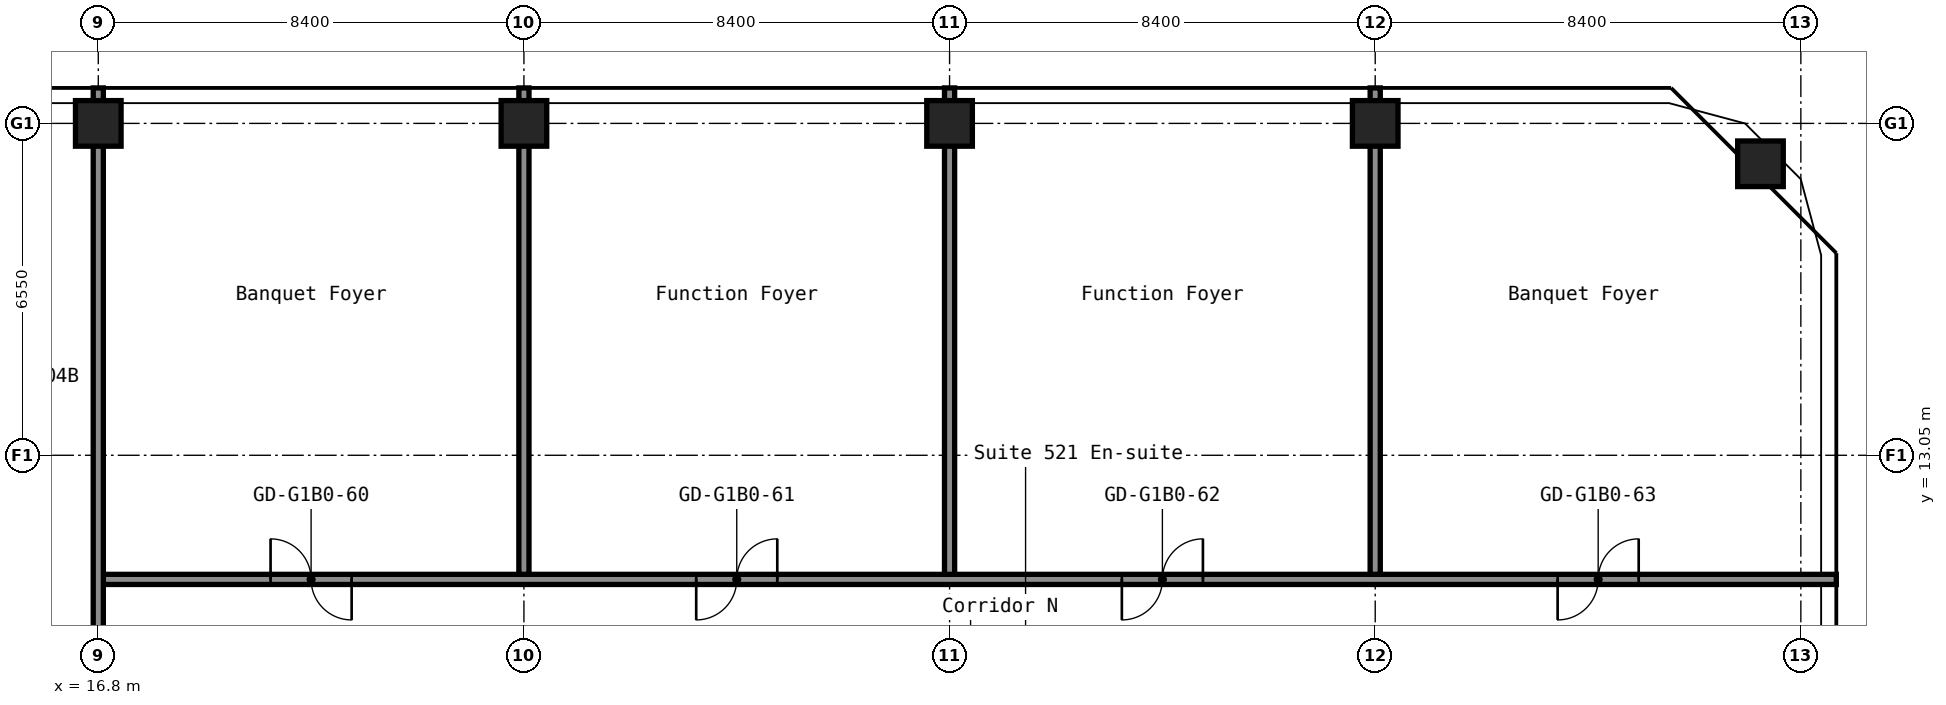
"""IFC4 building model, lengths in metres.
Left out: names, types, materials, properties, quantities, classifications, styles, units other than length and angle.
Written with IfcOpenShell. Run it as: python <this file> out.ifc"""

import sys

from ifc_helpers import new_model, si_unit, direction, frame, frame_2d, origin, origin_2d, place, context, subcontext, project, spatial, rectangle, hollow_rectangle, extrude, element, fill, save


model = new_model("IFC4")
c1 = context("Model", 3, precision=1e-05, world=origin(), true_north=direction((0.0, 1.0)))
c2 = subcontext(c1, "Body", "Model", "MODEL_VIEW")
j1 = project(units=[si_unit("LENGTHUNIT", "METRE"), si_unit("PLANEANGLEUNIT", "RADIAN")], contexts=[c1])
p1 = place(None, origin())
s1 = spatial("IfcSite", under=j1, at=p1, CompositionType="ELEMENT")
p2 = place(p1, origin())
s2 = spatial("IfcBuilding", under=s1, at=p2, CompositionType="ELEMENT")
p3 = place(p2, frame((0.0, 0.0, 23.0)))
s3 = spatial("IfcBuildingStorey", under=s2, at=p3, CompositionType="ELEMENT", Elevation=23.0)
for number, where, z_axis, x_axis in (
    (1, (16.8, 19.6, 0.0), (0.0, 0.0, 1.0), (1.0, 0.0, 0.0)),
    (2, (25.2, 19.6, 0.0), (0.0, 0.0, 1.0), (1.0, 0.0, 0.0)),
    (3, (33.6, 19.6, 0.0), (0.0, 0.0, 1.0), (1.0, 0.0, 0.0)),
    (4, (42.0, 19.6, 0.0), (0.0, 0.0, 1.0), (1.0, 0.0, 0.0)),
    (5, (49.603, 18.803, 0.0), (0.0, 0.0, 1.0), (1.0, 0.0, 0.0)),
):
    element("IfcColumn", number, at=place(p3, frame(where, z_axis=z_axis, x_axis=x_axis)), inside=s3, PredefinedType="COLUMN", context=c2, shape_type="SweptSolid", body=[
        extrude(hollow_rectangle(XDim=0.9, YDim=0.9, WallThickness=0.036, at=origin_2d()), origin(), (0.0, 0.0, 1.0), 2.8),
    ])
p4 = place(p3, frame((16.8, 10.6, 0.0), z_axis=(0.0, 0.0, 1.0), x_axis=(1.0, 0.0, 0.0)))
e6 = element("IfcWall", 6, at=p4, inside=s3, PredefinedType="PARTITIONING", context=c2, shape_type="SweptSolid", body=[
    extrude(rectangle(XDim=34.3, YDim=0.2, at=frame_2d((17.15, 0.0))), origin(), (0.0, 0.0, 1.0), 2.8),
])
p5 = place(p4, frame((3.4, 0.0, 0.0)))
e7 = element("IfcOpeningElement", 7, at=p5, cuts=e6, PredefinedType="OPENING", context=c2, shape_type="SweptSolid", body=[
    extrude(rectangle(XDim=1.6, YDim=2.1, at=frame_2d((0.8, 1.05))), frame((0.0, 0.11, 0.0), z_axis=(0.0, -1.0, 0.0), x_axis=(1.0, 0.0, 0.0)), (0.0, 0.0, 1.0), 0.22),
])
p6 = place(p4, frame((11.8, 0.0, 0.0)))
e8 = element("IfcOpeningElement", 8, at=p6, cuts=e6, PredefinedType="OPENING", context=c2, shape_type="SweptSolid", body=[
    extrude(rectangle(XDim=1.6, YDim=2.1, at=frame_2d((0.8, 1.05))), frame((0.0, 0.11, 0.0), z_axis=(0.0, -1.0, 0.0), x_axis=(1.0, 0.0, 0.0)), (0.0, 0.0, 1.0), 0.22),
])
p7 = place(p4, frame((20.2, 0.0, 0.0)))
e9 = element("IfcOpeningElement", 9, at=p7, cuts=e6, PredefinedType="OPENING", context=c2, shape_type="SweptSolid", body=[
    extrude(rectangle(XDim=1.6, YDim=2.1, at=frame_2d((0.8, 1.05))), frame((0.0, 0.11, 0.0), z_axis=(0.0, -1.0, 0.0), x_axis=(1.0, 0.0, 0.0)), (0.0, 0.0, 1.0), 0.22),
])
p8 = place(p4, frame((28.8, 0.0, 0.0)))
e10 = element("IfcOpeningElement", 10, at=p8, cuts=e6, PredefinedType="OPENING", context=c2, shape_type="SweptSolid", body=[
    extrude(rectangle(XDim=1.6, YDim=2.1, at=frame_2d((0.8, 1.05))), frame((0.0, 0.11, 0.0), z_axis=(0.0, -1.0, 0.0), x_axis=(1.0, 0.0, 0.0)), (0.0, 0.0, 1.0), 0.22),
])
p9 = place(p3, frame((16.8, 8.39, 0.0), z_axis=(0.0, 0.0, 1.0), x_axis=(0.0, 1.0, 0.0)))
e11 = element("IfcWall", 11, at=p9, inside=s3, PredefinedType="PARTITIONING", context=c2, shape_type="SweptSolid", body=[
    extrude(rectangle(XDim=11.91, YDim=0.2, at=frame_2d((5.955, 0.0))), origin(), (0.0, 0.0, 1.0), 2.8),
])
for number, where, z_axis, x_axis in (
    (12, (25.2, 10.7, 0.0), (0.0, 0.0, 1.0), (0.0, 1.0, 0.0)),
    (13, (33.6, 10.7, 0.0), (0.0, 0.0, 1.0), (0.0, 1.0, 0.0)),
    (14, (42.0, 10.7, 0.0), (0.0, 0.0, 1.0), (0.0, 1.0, 0.0)),
):
    element("IfcWall", number, at=place(p3, frame(where, z_axis=z_axis, x_axis=x_axis)), inside=s3, PredefinedType="PARTITIONING", context=c2, shape_type="SweptSolid", body=[
        extrude(rectangle(XDim=9.6, YDim=0.2, at=frame_2d((4.8, 0.0))), origin(), (0.0, 0.0, 1.0), 2.8),
    ])
p10 = place(p5, origin())
e15 = element("IfcDoor", 15, at=p10, inside=s3, OperationType="DOUBLE_DOOR_SINGLE_SWING", PredefinedType="DOOR", context=c2, shape_type="SweptSolid", body=[
    extrude(rectangle(XDim=1.6, YDim=2.1, at=frame_2d((0.8, 1.05))), frame((0.0, 0.025, 0.0), z_axis=(0.0, -1.0, 0.0), x_axis=(1.0, 0.0, 0.0)), (0.0, 0.0, 1.0), 0.05),
])
fill(e7, e15)
p11 = place(p6, origin())
e16 = element("IfcDoor", 16, at=p11, inside=s3, OperationType="DOUBLE_DOOR_SINGLE_SWING", PredefinedType="DOOR", context=c2, shape_type="SweptSolid", body=[
    extrude(rectangle(XDim=1.6, YDim=2.1, at=frame_2d((0.8, 1.05))), frame((0.0, 0.025, 0.0), z_axis=(0.0, -1.0, 0.0), x_axis=(1.0, 0.0, 0.0)), (0.0, 0.0, 1.0), 0.05),
])
fill(e8, e16)
p12 = place(p7, origin())
e17 = element("IfcDoor", 17, at=p12, inside=s3, OperationType="DOUBLE_DOOR_SINGLE_SWING", PredefinedType="DOOR", context=c2, shape_type="SweptSolid", body=[
    extrude(rectangle(XDim=1.6, YDim=2.1, at=frame_2d((0.8, 1.05))), frame((0.0, 0.025, 0.0), z_axis=(0.0, -1.0, 0.0), x_axis=(1.0, 0.0, 0.0)), (0.0, 0.0, 1.0), 0.05),
])
fill(e9, e17)
p13 = place(p8, origin())
e18 = element("IfcDoor", 18, at=p13, inside=s3, OperationType="DOUBLE_DOOR_SINGLE_SWING", PredefinedType="DOOR", context=c2, shape_type="SweptSolid", body=[
    extrude(rectangle(XDim=1.6, YDim=2.1, at=frame_2d((0.8, 1.05))), frame((0.0, 0.025, 0.0), z_axis=(0.0, -1.0, 0.0), x_axis=(1.0, 0.0, 0.0)), (0.0, 0.0, 1.0), 0.05),
])
fill(e10, e18)
save(model, sys.argv[1])
